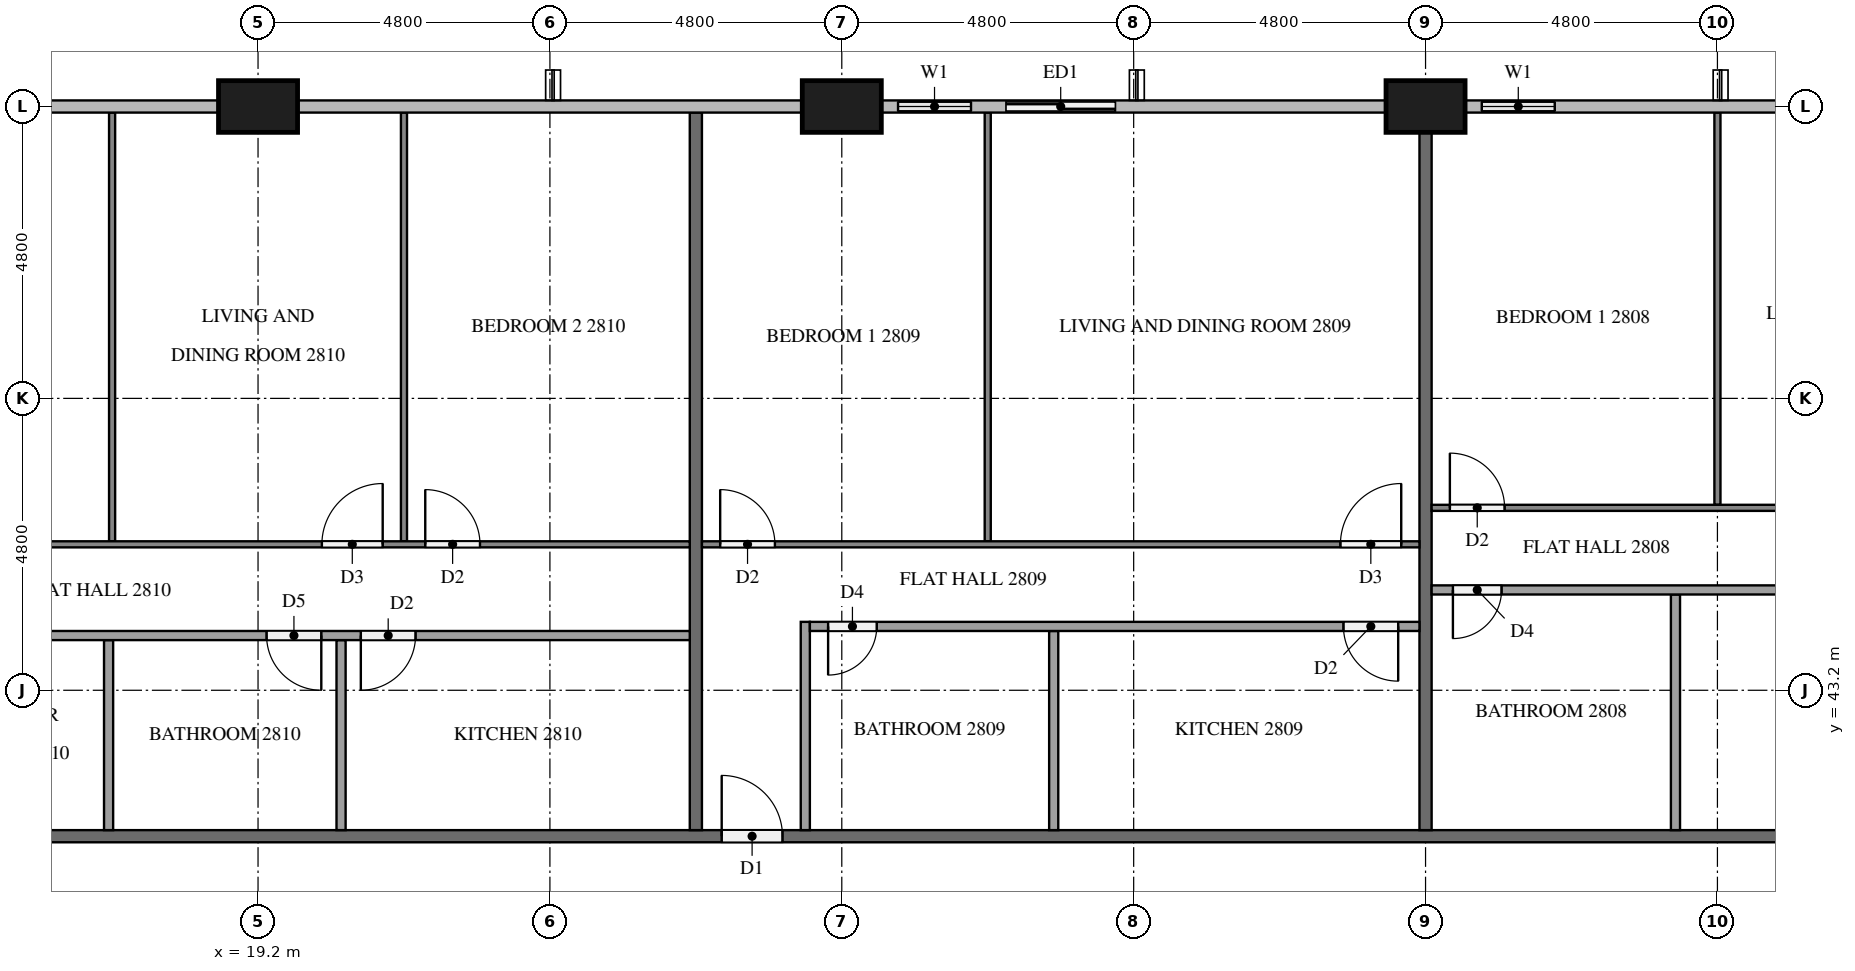
"""IFC4 building model, lengths in metres.
Left out: names, types, materials, properties, quantities, classifications, styles, units other than length and angle.
Written with IfcOpenShell. Run it as: python <this file> out.ifc"""

import sys

from ifc_helpers import new_model, si_unit, direction, frame, frame_2d, origin, origin_2d, place, context, subcontext, project, spatial, rectangle, extrude, element, fill, save


model = new_model("IFC4")
c1 = context("Model", 3, precision=1e-05, world=origin(), true_north=direction((0.0, 1.0)))
c2 = subcontext(c1, "Body", "Model", "MODEL_VIEW")
j1 = project(units=[si_unit("LENGTHUNIT", "METRE"), si_unit("PLANEANGLEUNIT", "RADIAN")], contexts=[c1])
p1 = place(None, origin())
s1 = spatial("IfcSite", under=j1, at=p1, CompositionType="ELEMENT")
p2 = place(p1, origin())
s2 = spatial("IfcBuilding", under=s1, at=p2, CompositionType="ELEMENT")
p3 = place(p2, frame((0.0, 0.0, 110.2)))
s3 = spatial("IfcBuildingStorey", under=s2, at=p3, CompositionType="ELEMENT", Elevation=110.2)
for number, where, z_axis, x_axis in (
    (1, (38.4, 52.8, 0.0), (0.0, 0.0, 1.0), (1.0, 0.0, 0.0)),
    (2, (28.8, 52.8, 0.0), (0.0, 0.0, 1.0), (1.0, 0.0, 0.0)),
    (3, (19.2, 52.8, 0.0), (0.0, 0.0, 1.0), (1.0, 0.0, 0.0)),
):
    element("IfcColumn", number, at=place(p3, frame(where, z_axis=z_axis, x_axis=x_axis)), inside=s3, PredefinedType="COLUMN", context=c2, shape_type="SweptSolid", body=[
        extrude(rectangle(XDim=1.3, YDim=0.85, at=origin_2d()), origin(), (0.0, 0.0, 1.0), 3.1),
    ])
p4 = place(p3, frame((40.8, 52.8, 0.0), z_axis=(0.0, 0.0, 1.0), x_axis=(-1.0, 0.0, 0.0)))
e4 = element("IfcWall", 4, at=p4, inside=s3, PredefinedType="SOLIDWALL", context=c2, shape_type="SweptSolid", body=[
    extrude(rectangle(XDim=1.75, YDim=0.15, at=frame_2d((0.875, 0.0))), origin(), (0.0, 0.0, 1.0), 3.1),
])
p5 = place(p4, frame((0.275, 0.0, 0.9)))
e5 = element("IfcOpeningElement", 5, at=p5, cuts=e4, PredefinedType="OPENING", context=c2, shape_type="SweptSolid", body=[
    extrude(rectangle(XDim=1.2, YDim=1.4, at=frame_2d((0.6, 0.7))), frame((0.0, 0.085, 0.0), z_axis=(0.0, -1.0, 0.0), x_axis=(1.0, 0.0, 0.0)), (0.0, 0.0, 1.0), 0.17),
])
p6 = place(p3, frame((33.6, 52.8, 0.0), z_axis=(0.0, 0.0, 1.0), x_axis=(-1.0, 0.0, 0.0)))
e6 = element("IfcWall", 6, at=p6, inside=s3, PredefinedType="SOLIDWALL", context=c2, shape_type="SweptSolid", body=[
    extrude(rectangle(XDim=4.15, YDim=0.15, at=frame_2d((2.075, 0.0))), origin(), (0.0, 0.0, 1.0), 3.1),
])
p7 = place(p6, frame((0.3, 0.0, 0.0)))
e7 = element("IfcOpeningElement", 7, at=p7, cuts=e6, PredefinedType="OPENING", context=c2, shape_type="SweptSolid", body=[
    extrude(rectangle(XDim=1.8, YDim=2.4, at=frame_2d((0.9, 1.2))), frame((0.0, 0.085, 0.0), z_axis=(0.0, -1.0, 0.0), x_axis=(1.0, 0.0, 0.0)), (0.0, 0.0, 1.0), 0.17),
])
p8 = place(p6, frame((2.675, 0.0, 0.9)))
e8 = element("IfcOpeningElement", 8, at=p8, cuts=e6, PredefinedType="OPENING", context=c2, shape_type="SweptSolid", body=[
    extrude(rectangle(XDim=1.2, YDim=1.4, at=frame_2d((0.6, 0.7))), frame((0.0, 0.085, 0.0), z_axis=(0.0, -1.0, 0.0), x_axis=(1.0, 0.0, 0.0)), (0.0, 0.0, 1.0), 0.17),
])
p9 = place(p3, frame((11.9, 40.8, 0.0), z_axis=(0.0, 0.0, 1.0), x_axis=(1.0, 0.0, 0.0)))
e9 = element("IfcWall", 9, at=p9, inside=s3, PredefinedType="PARTITIONING", context=c2, shape_type="SweptSolid", body=[
    extrude(rectangle(XDim=38.6, YDim=0.2, at=frame_2d((19.3, 0.0))), origin(), (0.0, 0.0, 1.0), 3.1),
])
p10 = place(p9, frame((37.075, 0.0, 0.0)))
e10 = element("IfcOpeningElement", 10, at=p10, cuts=e9, PredefinedType="OPENING", context=c2, shape_type="SweptSolid", body=[
    extrude(rectangle(XDim=1.0, YDim=2.1, at=frame_2d((0.5, 1.05))), frame((0.0, 0.11, 0.0), z_axis=(0.0, -1.0, 0.0), x_axis=(1.0, 0.0, 0.0)), (0.0, 0.0, 1.0), 0.22),
])
p11 = place(p9, frame((14.925, 0.0, 0.0)))
e11 = element("IfcOpeningElement", 11, at=p11, cuts=e9, PredefinedType="OPENING", context=c2, shape_type="SweptSolid", body=[
    extrude(rectangle(XDim=1.0, YDim=2.1, at=frame_2d((0.5, 1.05))), frame((0.0, 0.11, 0.0), z_axis=(0.0, -1.0, 0.0), x_axis=(1.0, 0.0, 0.0)), (0.0, 0.0, 1.0), 0.22),
])
p12 = place(p9, frame((0.525, 0.0, 0.0)))
e12 = element("IfcOpeningElement", 12, at=p12, cuts=e9, PredefinedType="OPENING", context=c2, shape_type="SweptSolid", body=[
    extrude(rectangle(XDim=1.0, YDim=2.1, at=frame_2d((0.5, 1.05))), frame((0.0, 0.11, 0.0), z_axis=(0.0, -1.0, 0.0), x_axis=(1.0, 0.0, 0.0)), (0.0, 0.0, 1.0), 0.22),
])
p13 = place(p3, frame((38.4, 52.375, 0.0), z_axis=(0.0, 0.0, 1.0), x_axis=(0.0, -1.0, 0.0)))
e13 = element("IfcWall", 13, at=p13, inside=s3, PredefinedType="PARTITIONING", context=c2, shape_type="SweptSolid", body=[
    extrude(rectangle(XDim=11.475, YDim=0.2, at=frame_2d((5.738, 0.0))), origin(), (0.0, 0.0, 1.0), 3.1),
])
p14 = place(p3, frame((26.4, 52.7, 0.0), z_axis=(0.0, 0.0, 1.0), x_axis=(0.0, -1.0, 0.0)))
e14 = element("IfcWall", 14, at=p14, inside=s3, PredefinedType="PARTITIONING", context=c2, shape_type="SweptSolid", body=[
    extrude(rectangle(XDim=11.8, YDim=0.2, at=frame_2d((5.9, 0.0))), origin(), (0.0, 0.0, 1.0), 3.1),
])
p15 = place(p3, frame((43.2, 46.25, 0.0), z_axis=(0.0, 0.0, 1.0), x_axis=(0.0, 1.0, 0.0)))
e15 = element("IfcWall", 15, at=p15, inside=s3, PredefinedType="PARTITIONING", context=c2, shape_type="SweptSolid", body=[
    extrude(rectangle(XDim=6.45, YDim=0.1, at=frame_2d((3.225, 0.0))), origin(), (0.0, 0.0, 1.0), 3.1),
])
p16 = place(p3, frame((38.5, 46.2, 0.0), z_axis=(0.0, 0.0, 1.0), x_axis=(1.0, 0.0, 0.0)))
e16 = element("IfcWall", 16, at=p16, inside=s3, PredefinedType="PARTITIONING", context=c2, shape_type="SweptSolid", body=[
    extrude(rectangle(XDim=11.8, YDim=0.1, at=frame_2d((5.9, 0.0))), origin(), (0.0, 0.0, 1.0), 3.1),
])
p17 = place(p16, frame((10.5, 0.0, 0.0)))
e17 = element("IfcOpeningElement", 17, at=p17, cuts=e16, PredefinedType="OPENING", context=c2, shape_type="SweptSolid", body=[
    extrude(rectangle(XDim=1.0, YDim=2.1, at=frame_2d((0.5, 1.05))), frame((0.0, 0.06, 0.0), z_axis=(0.0, -1.0, 0.0), x_axis=(1.0, 0.0, 0.0)), (0.0, 0.0, 1.0), 0.12),
])
p18 = place(p16, frame((0.3, 0.0, 0.0)))
e18 = element("IfcOpeningElement", 18, at=p18, cuts=e16, PredefinedType="OPENING", context=c2, shape_type="SweptSolid", body=[
    extrude(rectangle(XDim=0.9, YDim=2.1, at=frame_2d((0.45, 1.05))), frame((0.0, 0.06, 0.0), z_axis=(0.0, -1.0, 0.0), x_axis=(1.0, 0.0, 0.0)), (0.0, 0.0, 1.0), 0.12),
])
p19 = place(p3, frame((42.51, 40.9, 0.0), z_axis=(0.0, 0.0, 1.0), x_axis=(0.0, 1.0, 0.0)))
e19 = element("IfcWall", 19, at=p19, inside=s3, PredefinedType="PARTITIONING", context=c2, shape_type="SweptSolid", body=[
    extrude(rectangle(XDim=3.875, YDim=0.15, at=frame_2d((1.938, 0.0))), origin(), (0.0, 0.0, 1.0), 3.1),
])
p20 = place(p3, frame((48.525, 44.85, 0.0), z_axis=(0.0, 0.0, 1.0), x_axis=(-1.0, 0.0, 0.0)))
e20 = element("IfcWall", 20, at=p20, inside=s3, PredefinedType="PARTITIONING", context=c2, shape_type="SweptSolid", body=[
    extrude(rectangle(XDim=10.025, YDim=0.15, at=frame_2d((5.012, 0.0))), origin(), (0.0, 0.0, 1.0), 3.1),
])
p21 = place(p20, frame((0.3, 0.0, 0.0)))
e21 = element("IfcOpeningElement", 21, at=p21, cuts=e20, PredefinedType="OPENING", context=c2, shape_type="SweptSolid", body=[
    extrude(rectangle(XDim=0.9, YDim=2.1, at=frame_2d((0.45, 1.05))), frame((0.0, 0.085, 0.0), z_axis=(0.0, -1.0, 0.0), x_axis=(1.0, 0.0, 0.0)), (0.0, 0.0, 1.0), 0.17),
])
p22 = place(p20, frame((8.875, 0.0, 0.0)))
e22 = element("IfcOpeningElement", 22, at=p22, cuts=e20, PredefinedType="OPENING", context=c2, shape_type="SweptSolid", body=[
    extrude(rectangle(XDim=0.8, YDim=2.1, at=frame_2d((0.4, 1.05))), frame((0.0, 0.085, 0.0), z_axis=(0.0, -1.0, 0.0), x_axis=(1.0, 0.0, 0.0)), (0.0, 0.0, 1.0), 0.17),
])
p23 = place(p3, frame((31.2, 45.65, 0.0), z_axis=(0.0, 0.0, 1.0), x_axis=(0.0, 1.0, 0.0)))
e23 = element("IfcWall", 23, at=p23, inside=s3, PredefinedType="PARTITIONING", context=c2, shape_type="SweptSolid", body=[
    extrude(rectangle(XDim=7.05, YDim=0.1, at=frame_2d((3.525, 0.0))), origin(), (0.0, 0.0, 1.0), 3.1),
])
p24 = place(p3, frame((26.5, 45.6, 0.0), z_axis=(0.0, 0.0, 1.0), x_axis=(1.0, 0.0, 0.0)))
e24 = element("IfcWall", 24, at=p24, inside=s3, PredefinedType="PARTITIONING", context=c2, shape_type="SweptSolid", body=[
    extrude(rectangle(XDim=11.8, YDim=0.1, at=frame_2d((5.9, 0.0))), origin(), (0.0, 0.0, 1.0), 3.1),
])
p25 = place(p24, frame((0.3, 0.0, 0.0)))
e25 = element("IfcOpeningElement", 25, at=p25, cuts=e24, PredefinedType="OPENING", context=c2, shape_type="SweptSolid", body=[
    extrude(rectangle(XDim=0.9, YDim=2.1, at=frame_2d((0.45, 1.05))), frame((0.0, 0.06, 0.0), z_axis=(0.0, -1.0, 0.0), x_axis=(1.0, 0.0, 0.0)), (0.0, 0.0, 1.0), 0.12),
])
p26 = place(p24, frame((10.5, 0.0, 0.0)))
e26 = element("IfcOpeningElement", 26, at=p26, cuts=e24, PredefinedType="OPENING", context=c2, shape_type="SweptSolid", body=[
    extrude(rectangle(XDim=1.0, YDim=2.1, at=frame_2d((0.5, 1.05))), frame((0.0, 0.06, 0.0), z_axis=(0.0, -1.0, 0.0), x_axis=(1.0, 0.0, 0.0)), (0.0, 0.0, 1.0), 0.12),
])
p27 = place(p3, frame((32.285, 40.9, 0.0), z_axis=(0.0, 0.0, 1.0), x_axis=(0.0, 1.0, 0.0)))
e27 = element("IfcWall", 27, at=p27, inside=s3, PredefinedType="PARTITIONING", context=c2, shape_type="SweptSolid", body=[
    extrude(rectangle(XDim=3.275, YDim=0.15, at=frame_2d((1.638, 0.0))), origin(), (0.0, 0.0, 1.0), 3.1),
])
p28 = place(p3, frame((28.2, 40.9, 0.0), z_axis=(0.0, 0.0, 1.0), x_axis=(0.0, 1.0, 0.0)))
e28 = element("IfcWall", 28, at=p28, inside=s3, PredefinedType="PARTITIONING", context=c2, shape_type="SweptSolid", body=[
    extrude(rectangle(XDim=3.425, YDim=0.15, at=frame_2d((1.712, 0.0))), origin(), (0.0, 0.0, 1.0), 3.1),
])
p29 = place(p3, frame((38.3, 44.25, 0.0), z_axis=(0.0, 0.0, 1.0), x_axis=(-1.0, 0.0, 0.0)))
e29 = element("IfcWall", 29, at=p29, inside=s3, PredefinedType="PARTITIONING", context=c2, shape_type="SweptSolid", body=[
    extrude(rectangle(XDim=10.025, YDim=0.15, at=frame_2d((5.013, 0.0))), origin(), (0.0, 0.0, 1.0), 3.1),
])
p30 = place(p29, frame((8.925, 0.0, 0.0)))
e30 = element("IfcOpeningElement", 30, at=p30, cuts=e29, PredefinedType="OPENING", context=c2, shape_type="SweptSolid", body=[
    extrude(rectangle(XDim=0.8, YDim=2.1, at=frame_2d((0.4, 1.05))), frame((0.0, 0.085, 0.0), z_axis=(0.0, -1.0, 0.0), x_axis=(1.0, 0.0, 0.0)), (0.0, 0.0, 1.0), 0.17),
])
p31 = place(p29, frame((0.35, 0.0, 0.0)))
e31 = element("IfcOpeningElement", 31, at=p31, cuts=e29, PredefinedType="OPENING", context=c2, shape_type="SweptSolid", body=[
    extrude(rectangle(XDim=0.9, YDim=2.1, at=frame_2d((0.45, 1.05))), frame((0.0, 0.085, 0.0), z_axis=(0.0, -1.0, 0.0), x_axis=(1.0, 0.0, 0.0)), (0.0, 0.0, 1.0), 0.17),
])
for number, where, z_axis, x_axis in (
    (32, (16.8, 45.65, 0.0), (0.0, 0.0, 1.0), (0.0, 1.0, 0.0)),
    (33, (21.6, 45.65, 0.0), (0.0, 0.0, 1.0), (0.0, 1.0, 0.0)),
):
    element("IfcWall", number, at=place(p3, frame(where, z_axis=z_axis, x_axis=x_axis)), inside=s3, PredefinedType="PARTITIONING", context=c2, shape_type="SweptSolid", body=[
        extrude(rectangle(XDim=7.05, YDim=0.1, at=frame_2d((3.525, 0.0))), origin(), (0.0, 0.0, 1.0), 3.1),
    ])
p32 = place(p3, frame((12.1, 45.6, 0.0), z_axis=(0.0, 0.0, 1.0), x_axis=(1.0, 0.0, 0.0)))
e34 = element("IfcWall", 34, at=p32, inside=s3, PredefinedType="PARTITIONING", context=c2, shape_type="SweptSolid", body=[
    extrude(rectangle(XDim=14.2, YDim=0.1, at=frame_2d((7.1, 0.0))), origin(), (0.0, 0.0, 1.0), 3.1),
])
p33 = place(p32, frame((0.3, 0.0, 0.0)))
e35 = element("IfcOpeningElement", 35, at=p33, cuts=e34, PredefinedType="OPENING", context=c2, shape_type="SweptSolid", body=[
    extrude(rectangle(XDim=0.9, YDim=2.1, at=frame_2d((0.45, 1.05))), frame((0.0, 0.06, 0.0), z_axis=(0.0, -1.0, 0.0), x_axis=(1.0, 0.0, 0.0)), (0.0, 0.0, 1.0), 0.12),
])
p34 = place(p32, frame((8.15, 0.0, 0.0)))
e36 = element("IfcOpeningElement", 36, at=p34, cuts=e34, PredefinedType="OPENING", context=c2, shape_type="SweptSolid", body=[
    extrude(rectangle(XDim=1.0, YDim=2.1, at=frame_2d((0.5, 1.05))), frame((0.0, 0.06, 0.0), z_axis=(0.0, -1.0, 0.0), x_axis=(1.0, 0.0, 0.0)), (0.0, 0.0, 1.0), 0.12),
])
p35 = place(p32, frame((9.85, 0.0, 0.0)))
e37 = element("IfcOpeningElement", 37, at=p35, cuts=e34, PredefinedType="OPENING", context=c2, shape_type="SweptSolid", body=[
    extrude(rectangle(XDim=0.9, YDim=2.1, at=frame_2d((0.45, 1.05))), frame((0.0, 0.06, 0.0), z_axis=(0.0, -1.0, 0.0), x_axis=(1.0, 0.0, 0.0)), (0.0, 0.0, 1.0), 0.12),
])
for number, where, z_axis, x_axis in (
    (38, (16.742, 40.9, 0.0), (0.0, 0.0, 1.0), (0.0, 1.0, 0.0)),
    (39, (20.565, 40.9, 0.0), (0.0, 0.0, 1.0), (0.0, 1.0, 0.0)),
):
    element("IfcWall", number, at=place(p3, frame(where, z_axis=z_axis, x_axis=x_axis)), inside=s3, PredefinedType="PARTITIONING", context=c2, shape_type="SweptSolid", body=[
        extrude(rectangle(XDim=3.125, YDim=0.15, at=frame_2d((1.562, 0.0))), origin(), (0.0, 0.0, 1.0), 3.1),
    ])
p36 = place(p3, frame((26.3, 44.1, 0.0), z_axis=(0.0, 0.0, 1.0), x_axis=(-1.0, 0.0, 0.0)))
e40 = element("IfcWall", 40, at=p36, inside=s3, PredefinedType="PARTITIONING", context=c2, shape_type="SweptSolid", body=[
    extrude(rectangle(XDim=12.425, YDim=0.15, at=frame_2d((6.212, 0.0))), origin(), (0.0, 0.0, 1.0), 3.1),
])
p37 = place(p36, frame((11.325, 0.0, 0.0)))
e41 = element("IfcOpeningElement", 41, at=p37, cuts=e40, PredefinedType="OPENING", context=c2, shape_type="SweptSolid", body=[
    extrude(rectangle(XDim=0.8, YDim=2.1, at=frame_2d((0.4, 1.05))), frame((0.0, 0.085, 0.0), z_axis=(0.0, -1.0, 0.0), x_axis=(1.0, 0.0, 0.0)), (0.0, 0.0, 1.0), 0.17),
])
p38 = place(p36, frame((6.06, 0.0, 0.0)))
e42 = element("IfcOpeningElement", 42, at=p38, cuts=e40, PredefinedType="OPENING", context=c2, shape_type="SweptSolid", body=[
    extrude(rectangle(XDim=0.9, YDim=2.1, at=frame_2d((0.45, 1.05))), frame((0.0, 0.085, 0.0), z_axis=(0.0, -1.0, 0.0), x_axis=(1.0, 0.0, 0.0)), (0.0, 0.0, 1.0), 0.17),
])
p39 = place(p36, frame((4.51, 0.0, 0.0)))
e43 = element("IfcOpeningElement", 43, at=p39, cuts=e40, PredefinedType="OPENING", context=c2, shape_type="SweptSolid", body=[
    extrude(rectangle(XDim=0.9, YDim=2.1, at=frame_2d((0.45, 1.05))), frame((0.0, 0.085, 0.0), z_axis=(0.0, -1.0, 0.0), x_axis=(1.0, 0.0, 0.0)), (0.0, 0.0, 1.0), 0.17),
])
p40 = place(p5, origin())
e44 = element("IfcWindow", 44, at=p40, inside=s3, PartitioningType="SINGLE_PANEL", PredefinedType="WINDOW", context=c2, shape_type="SweptSolid", body=[
    extrude(rectangle(XDim=1.2, YDim=1.4, at=frame_2d((0.6, 0.7))), frame((0.0, 0.03, 0.0), z_axis=(0.0, -1.0, 0.0), x_axis=(1.0, 0.0, 0.0)), (0.0, 0.0, 1.0), 0.06),
])
fill(e5, e44)
p41 = place(p7, origin())
e45 = element("IfcDoor", 45, at=p41, inside=s3, OperationType="SLIDING_TO_LEFT", PredefinedType="DOOR", context=c2, shape_type="SweptSolid", body=[
    extrude(rectangle(XDim=1.8, YDim=2.4, at=frame_2d((0.9, 1.2))), frame((0.0, 0.025, 0.0), z_axis=(0.0, -1.0, 0.0), x_axis=(1.0, 0.0, 0.0)), (0.0, 0.0, 1.0), 0.05),
])
fill(e7, e45)
p42 = place(p8, origin())
e46 = element("IfcWindow", 46, at=p42, inside=s3, PartitioningType="SINGLE_PANEL", PredefinedType="WINDOW", context=c2, shape_type="SweptSolid", body=[
    extrude(rectangle(XDim=1.2, YDim=1.4, at=frame_2d((0.6, 0.7))), frame((0.0, 0.03, 0.0), z_axis=(0.0, -1.0, 0.0), x_axis=(1.0, 0.0, 0.0)), (0.0, 0.0, 1.0), 0.06),
])
fill(e8, e46)
p43 = place(p11, origin())
e47 = element("IfcDoor", 47, at=p43, inside=s3, OperationType="SINGLE_SWING_LEFT", PredefinedType="DOOR", context=c2, shape_type="SweptSolid", body=[
    extrude(rectangle(XDim=1.0, YDim=2.1, at=frame_2d((0.5, 1.05))), frame((0.0, 0.025, 0.0), z_axis=(0.0, -1.0, 0.0), x_axis=(1.0, 0.0, 0.0)), (0.0, 0.0, 1.0), 0.05),
])
fill(e11, e47)
p44 = place(p18, origin())
e48 = element("IfcDoor", 48, at=p44, inside=s3, OperationType="SINGLE_SWING_LEFT", PredefinedType="DOOR", context=c2, shape_type="SweptSolid", body=[
    extrude(rectangle(XDim=0.9, YDim=2.1, at=frame_2d((0.45, 1.05))), frame((0.0, 0.025, 0.0), z_axis=(0.0, -1.0, 0.0), x_axis=(1.0, 0.0, 0.0)), (0.0, 0.0, 1.0), 0.05),
])
fill(e18, e48)
p45 = place(p22, origin())
e49 = element("IfcDoor", 49, at=p45, inside=s3, OperationType="SINGLE_SWING_RIGHT", PredefinedType="DOOR", context=c2, shape_type="SweptSolid", body=[
    extrude(rectangle(XDim=0.8, YDim=2.1, at=frame_2d((0.4, 1.05))), frame((0.0, 0.025, 0.0), z_axis=(0.0, -1.0, 0.0), x_axis=(1.0, 0.0, 0.0)), (0.0, 0.0, 1.0), 0.05),
])
fill(e22, e49)
p46 = place(p25, origin())
e50 = element("IfcDoor", 50, at=p46, inside=s3, OperationType="SINGLE_SWING_LEFT", PredefinedType="DOOR", context=c2, shape_type="SweptSolid", body=[
    extrude(rectangle(XDim=0.9, YDim=2.1, at=frame_2d((0.45, 1.05))), frame((0.0, 0.025, 0.0), z_axis=(0.0, -1.0, 0.0), x_axis=(1.0, 0.0, 0.0)), (0.0, 0.0, 1.0), 0.05),
])
fill(e25, e50)
p47 = place(p26, origin())
e51 = element("IfcDoor", 51, at=p47, inside=s3, OperationType="SINGLE_SWING_RIGHT", PredefinedType="DOOR", context=c2, shape_type="SweptSolid", body=[
    extrude(rectangle(XDim=1.0, YDim=2.1, at=frame_2d((0.5, 1.05))), frame((0.0, 0.025, 0.0), z_axis=(0.0, -1.0, 0.0), x_axis=(1.0, 0.0, 0.0)), (0.0, 0.0, 1.0), 0.05),
])
fill(e26, e51)
p48 = place(p30, origin())
e52 = element("IfcDoor", 52, at=p48, inside=s3, OperationType="SINGLE_SWING_RIGHT", PredefinedType="DOOR", context=c2, shape_type="SweptSolid", body=[
    extrude(rectangle(XDim=0.8, YDim=2.1, at=frame_2d((0.4, 1.05))), frame((0.0, 0.025, 0.0), z_axis=(0.0, -1.0, 0.0), x_axis=(1.0, 0.0, 0.0)), (0.0, 0.0, 1.0), 0.05),
])
fill(e30, e52)
p49 = place(p31, origin())
e53 = element("IfcDoor", 53, at=p49, inside=s3, OperationType="SINGLE_SWING_LEFT", PredefinedType="DOOR", context=c2, shape_type="SweptSolid", body=[
    extrude(rectangle(XDim=0.9, YDim=2.1, at=frame_2d((0.45, 1.05))), frame((0.0, 0.025, 0.0), z_axis=(0.0, -1.0, 0.0), x_axis=(1.0, 0.0, 0.0)), (0.0, 0.0, 1.0), 0.05),
])
fill(e31, e53)
p50 = place(p34, origin())
e54 = element("IfcDoor", 54, at=p50, inside=s3, OperationType="SINGLE_SWING_RIGHT", PredefinedType="DOOR", context=c2, shape_type="SweptSolid", body=[
    extrude(rectangle(XDim=1.0, YDim=2.1, at=frame_2d((0.5, 1.05))), frame((0.0, 0.025, 0.0), z_axis=(0.0, -1.0, 0.0), x_axis=(1.0, 0.0, 0.0)), (0.0, 0.0, 1.0), 0.05),
])
fill(e36, e54)
p51 = place(p35, origin())
e55 = element("IfcDoor", 55, at=p51, inside=s3, OperationType="SINGLE_SWING_LEFT", PredefinedType="DOOR", context=c2, shape_type="SweptSolid", body=[
    extrude(rectangle(XDim=0.9, YDim=2.1, at=frame_2d((0.45, 1.05))), frame((0.0, 0.025, 0.0), z_axis=(0.0, -1.0, 0.0), x_axis=(1.0, 0.0, 0.0)), (0.0, 0.0, 1.0), 0.05),
])
fill(e37, e55)
p52 = place(p38, origin())
e56 = element("IfcDoor", 56, at=p52, inside=s3, OperationType="SINGLE_SWING_LEFT", PredefinedType="DOOR", context=c2, shape_type="SweptSolid", body=[
    extrude(rectangle(XDim=0.9, YDim=2.1, at=frame_2d((0.45, 1.05))), frame((0.0, 0.025, 0.0), z_axis=(0.0, -1.0, 0.0), x_axis=(1.0, 0.0, 0.0)), (0.0, 0.0, 1.0), 0.05),
])
fill(e42, e56)
p53 = place(p39, origin())
e57 = element("IfcDoor", 57, at=p53, inside=s3, OperationType="SINGLE_SWING_RIGHT", PredefinedType="DOOR", context=c2, shape_type="SweptSolid", body=[
    extrude(rectangle(XDim=0.9, YDim=2.1, at=frame_2d((0.45, 1.05))), frame((0.0, 0.025, 0.0), z_axis=(0.0, -1.0, 0.0), x_axis=(1.0, 0.0, 0.0)), (0.0, 0.0, 1.0), 0.05),
])
fill(e43, e57)
save(model, sys.argv[1])
